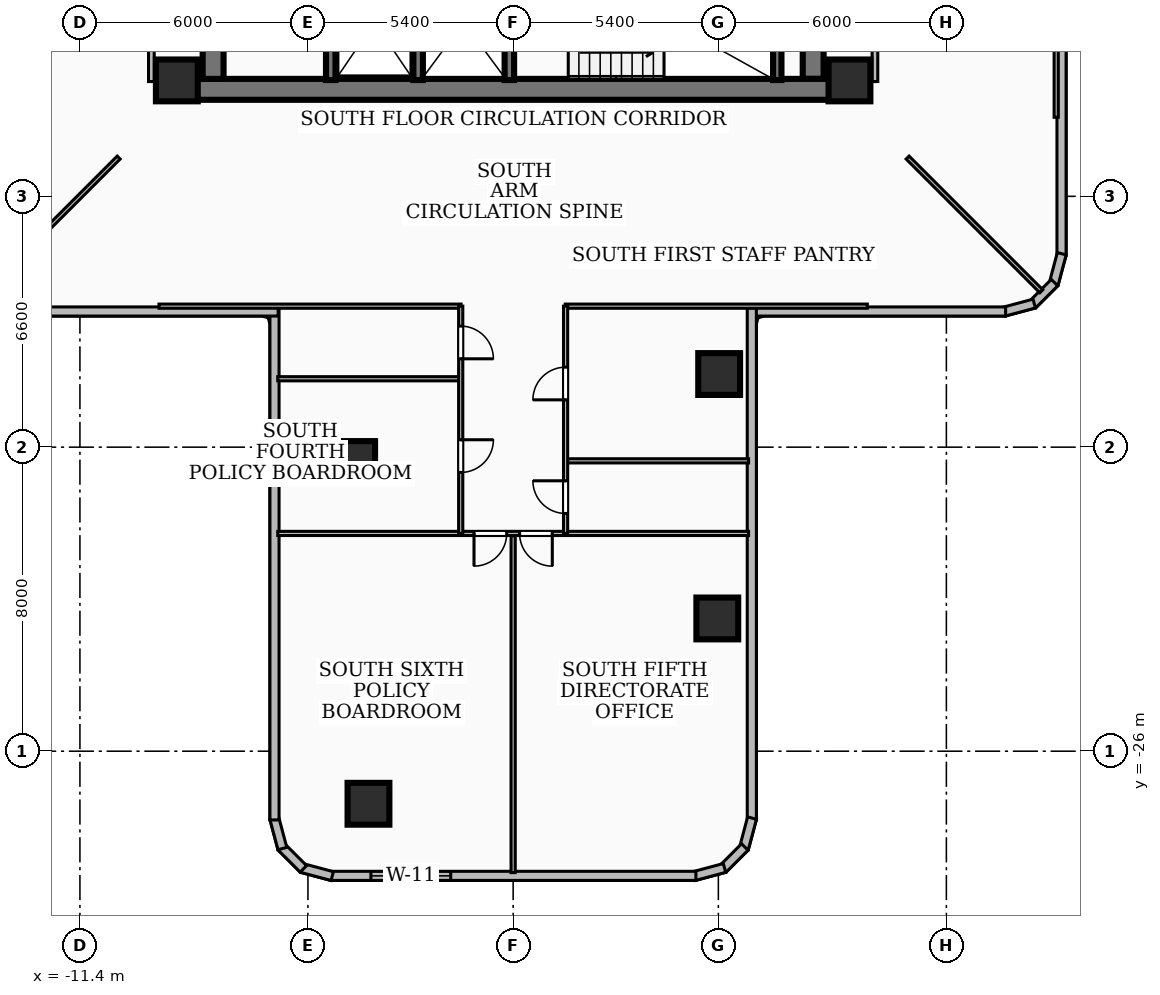
"""IFC4 building model, lengths in metres.
Left out: names, types, materials, properties, quantities, classifications, styles, units other than length and angle.
Written with IfcOpenShell. Run it as: python <this file> out.ifc"""

import sys

from ifc_helpers import new_model, si_unit, direction, frame, frame_2d, origin, origin_2d, place, context, subcontext, project, spatial, rectangle, extrude, element, fill, save


model = new_model("IFC4")
c1 = context("Model", 3, precision=1e-05, world=origin(), true_north=direction((0.0, 1.0)))
c2 = subcontext(c1, "Body", "Model", "MODEL_VIEW")
j1 = project(units=[si_unit("LENGTHUNIT", "METRE"), si_unit("PLANEANGLEUNIT", "RADIAN")], contexts=[c1])
p1 = place(None, origin())
s1 = spatial("IfcSite", under=j1, at=p1, CompositionType="ELEMENT")
p2 = place(p1, origin())
s2 = spatial("IfcBuilding", under=s1, at=p2, CompositionType="ELEMENT")
p3 = place(p2, frame((0.0, 0.0, 31.68)))
s3 = spatial("IfcBuildingStorey", under=s2, at=p3, CompositionType="ELEMENT", Elevation=31.68)
p4 = place(p3, frame((8.78, -8.585, 0.0), z_axis=(0.0, 0.0, 1.0), x_axis=(-1.0, 0.0, 0.0)))
e1 = element("IfcWall", 1, at=p4, inside=s3, PredefinedType="SHEAR", context=c2, shape_type="SweptSolid", body=[
    extrude(rectangle(XDim=17.56, YDim=0.55, at=frame_2d((8.78, 0.0))), origin(), (0.0, 0.0, 1.0), 3.34),
])
for number, where, z_axis, x_axis in (
    (2, (-7.895, -8.31, 0.0), (0.0, 0.0, 1.0), (0.0, 1.0, 0.0)),
    (3, (7.895, -2.025, 0.0), (0.0, 0.0, 1.0), (0.0, -1.0, 0.0)),
):
    element("IfcWall", number, at=place(p3, frame(where, z_axis=z_axis, x_axis=x_axis)), inside=s3, PredefinedType="SHEAR", context=c2, shape_type="SweptSolid", body=[
        extrude(rectangle(XDim=6.285, YDim=0.55, at=frame_2d((3.143, 0.0))), origin(), (0.0, 0.0, 1.0), 3.34),
    ])
p5 = place(p3, frame((6.95, -8.34, 0.0), z_axis=(0.0, 0.0, 1.0), x_axis=(0.0, 1.0, 0.0)))
e4 = element("IfcWall", 4, at=p5, inside=s3, PredefinedType="SOLIDWALL", context=c2, shape_type="SweptSolid", body=[
    extrude(rectangle(XDim=3.06, YDim=0.22, at=frame_2d((1.53, 0.0))), origin(), (0.0, 0.0, 1.0), 3.34),
])
for number, where, z_axis, x_axis in (
    (5, (-0.1, -8.34, 0.0), (0.0, 0.0, 1.0), (0.0, 1.0, 0.0)),
    (6, (-2.5, -8.34, 0.0), (0.0, 0.0, 1.0), (0.0, 1.0, 0.0)),
    (7, (-4.8, -8.34, 0.0), (0.0, 0.0, 1.0), (0.0, 1.0, 0.0)),
):
    element("IfcWall", number, at=place(p3, frame(where, z_axis=z_axis, x_axis=x_axis)), inside=s3, PredefinedType="SOLIDWALL", context=c2, shape_type="SweptSolid", body=[
        extrude(rectangle(XDim=3.04, YDim=0.25, at=frame_2d((1.52, 0.0))), origin(), (0.0, 0.0, 1.0), 3.34),
    ])
for number, where, z_axis, x_axis in (
    (8, (8.85, -8.35, 0.0), (0.0, 0.0, 1.0), (1.0, 0.0, 0.0)),
    (9, (-8.85, -8.35, 0.0), (0.0, 0.0, 1.0), (1.0, 0.0, 0.0)),
    (10, (-4.184, -18.391, 0.0), (0.0, 0.0, 1.0), (1.0, 0.0, 0.0)),
    (11, (5.421, -16.076, 0.0), (0.0, 0.0, 1.0), (1.0, 0.0, 0.0)),
    (12, (-3.807, -27.383, 0.0), (0.0, 0.0, 1.0), (1.0, 0.0, 0.0)),
    (13, (5.372, -22.507, 0.0), (0.0, 0.0, 1.0), (1.0, 0.0, 0.0)),
):
    element("IfcColumn", number, at=place(p3, frame(where, z_axis=z_axis, x_axis=x_axis)), inside=s3, PredefinedType="COLUMN", context=c2, shape_type="SweptSolid", body=[
        extrude(rectangle(XDim=1.1, YDim=1.1, at=origin_2d()), origin(), (0.0, 0.0, 1.0), 3.6),
    ])
p6 = place(p3, frame((14.43, -6.184, 0.0), z_axis=(0.0, 0.0, 1.0), x_axis=(0.0, -1.0, 0.0)))
e14 = element("IfcWall", 14, at=p6, inside=s3, PredefinedType="SOLIDWALL", context=c2, shape_type="SweptSolid", body=[
    extrude(rectangle(XDim=6.775, YDim=0.24, at=frame_2d((3.387, 0.0))), origin(), (0.0, 0.0, 1.0), 3.34),
])
p7 = place(p3, frame((14.436, -12.91, 0.0), z_axis=(0.0, 0.0, 1.0), x_axis=(-0.257937227116, -0.966161677396, 0.0)))
e15 = element("IfcWall", 15, at=p7, inside=s3, PredefinedType="SOLIDWALL", context=c2, shape_type="SweptSolid", body=[
    extrude(rectangle(XDim=0.83, YDim=0.24, at=frame_2d((0.415, 0.0))), origin(), (0.0, 0.0, 1.0), 3.34),
])
p8 = place(p3, frame((14.246, -13.67, 0.0), z_axis=(0.0, 0.0, 1.0), x_axis=(-0.707106781187, -0.707106781187, 0.0)))
e16 = element("IfcWall", 16, at=p8, inside=s3, PredefinedType="SOLIDWALL", context=c2, shape_type="SweptSolid", body=[
    extrude(rectangle(XDim=0.815, YDim=0.24, at=frame_2d((0.407, 0.0))), origin(), (0.0, 0.0, 1.0), 3.34),
])
p9 = place(p3, frame((13.712, -14.222, 0.0), z_axis=(0.0, 0.0, 1.0), x_axis=(-0.966161677396, -0.257937227116, 0.0)))
e17 = element("IfcWall", 17, at=p9, inside=s3, PredefinedType="SOLIDWALL", context=c2, shape_type="SweptSolid", body=[
    extrude(rectangle(XDim=0.83, YDim=0.24, at=frame_2d((0.415, 0.0))), origin(), (0.0, 0.0, 1.0), 3.34),
])
p10 = place(p3, frame((12.959, -14.43, 0.0), z_axis=(0.0, 0.0, 1.0), x_axis=(-1.0, 0.0, 0.0)))
e18 = element("IfcWall", 18, at=p10, inside=s3, PredefinedType="SOLIDWALL", context=c2, shape_type="SweptSolid", body=[
    extrude(rectangle(XDim=6.775, YDim=0.24, at=frame_2d((3.387, 0.0))), origin(), (0.0, 0.0, 1.0), 2.421),
])
p11 = place(p3, frame((6.28, -14.334, 0.0), z_axis=(0.0, 0.0, 1.0), x_axis=(0.0, -1.0, 0.0)))
e19 = element("IfcWall", 19, at=p11, inside=s3, PredefinedType="SOLIDWALL", context=c2, shape_type="SweptSolid", body=[
    extrude(rectangle(XDim=13.475, YDim=0.24, at=frame_2d((6.738, 0.0))), origin(), (0.0, 0.0, 1.0), 2.421),
])
p12 = place(p3, frame((6.286, -27.76, 0.0), z_axis=(0.0, 0.0, 1.0), x_axis=(-0.25766265056, -0.966234939601, 0.0)))
e20 = element("IfcWall", 20, at=p12, inside=s3, PredefinedType="SOLIDWALL", context=c2, shape_type="SweptSolid", body=[
    extrude(rectangle(XDim=0.83, YDim=0.24, at=frame_2d((0.415, 0.0))), origin(), (0.0, 0.0, 1.0), 3.34),
])
p13 = place(p3, frame((6.096, -28.52, 0.0), z_axis=(0.0, 0.0, 1.0), x_axis=(-0.707106781187, -0.707106781187, 0.0)))
e21 = element("IfcWall", 21, at=p13, inside=s3, PredefinedType="SOLIDWALL", context=c2, shape_type="SweptSolid", body=[
    extrude(rectangle(XDim=0.814, YDim=0.24, at=frame_2d((0.407, 0.0))), origin(), (0.0, 0.0, 1.0), 3.34),
])
p14 = place(p3, frame((5.562, -29.072, 0.0), z_axis=(0.0, 0.0, 1.0), x_axis=(-0.966234939601, -0.25766265056, 0.0)))
e22 = element("IfcWall", 22, at=p14, inside=s3, PredefinedType="SOLIDWALL", context=c2, shape_type="SweptSolid", body=[
    extrude(rectangle(XDim=0.83, YDim=0.24, at=frame_2d((0.415, 0.0))), origin(), (0.0, 0.0, 1.0), 3.34),
])
p15 = place(p3, frame((4.809, -29.28, 0.0), z_axis=(0.0, 0.0, 1.0), x_axis=(-1.0, 0.0, 0.0)))
e23 = element("IfcWall", 23, at=p15, inside=s3, PredefinedType="SOLIDWALL", context=c2, shape_type="SweptSolid", body=[
    extrude(rectangle(XDim=9.618, YDim=0.24, at=frame_2d((4.809, 0.0))), origin(), (0.0, 0.0, 1.0), 3.34),
])
p16 = place(p15, frame((6.452, 0.0, 0.85)))
e24 = element("IfcOpeningElement", 24, at=p16, cuts=e23, PredefinedType="OPENING", context=c2, shape_type="SweptSolid", body=[
    extrude(rectangle(XDim=2.1, YDim=1.6, at=frame_2d((1.05, 0.8))), frame((0.0, 0.13, 0.0), z_axis=(0.0, -1.0, 0.0), x_axis=(1.0, 0.0, 0.0)), (0.0, 0.0, 1.0), 0.26),
])
p17 = place(p3, frame((-4.76, -29.286, 0.0), z_axis=(0.0, 0.0, 1.0), x_axis=(-0.966234939601, 0.25766265056, 0.0)))
e25 = element("IfcWall", 25, at=p17, inside=s3, PredefinedType="SOLIDWALL", context=c2, shape_type="SweptSolid", body=[
    extrude(rectangle(XDim=0.83, YDim=0.24, at=frame_2d((0.415, 0.0))), origin(), (0.0, 0.0, 1.0), 3.34),
])
p18 = place(p3, frame((-5.52, -29.096, 0.0), z_axis=(0.0, 0.0, 1.0), x_axis=(-0.707106781187, 0.707106781187, 0.0)))
e26 = element("IfcWall", 26, at=p18, inside=s3, PredefinedType="SOLIDWALL", context=c2, shape_type="SweptSolid", body=[
    extrude(rectangle(XDim=0.814, YDim=0.24, at=frame_2d((0.407, 0.0))), origin(), (0.0, 0.0, 1.0), 3.34),
])
p19 = place(p3, frame((-6.072, -28.562, 0.0), z_axis=(0.0, 0.0, 1.0), x_axis=(-0.25766265056, 0.966234939601, 0.0)))
e27 = element("IfcWall", 27, at=p19, inside=s3, PredefinedType="SOLIDWALL", context=c2, shape_type="SweptSolid", body=[
    extrude(rectangle(XDim=0.83, YDim=0.24, at=frame_2d((0.415, 0.0))), origin(), (0.0, 0.0, 1.0), 3.34),
])
p20 = place(p3, frame((-6.28, -27.809, 0.0), z_axis=(0.0, 0.0, 1.0), x_axis=(0.0, 1.0, 0.0)))
e28 = element("IfcWall", 28, at=p20, inside=s3, PredefinedType="SOLIDWALL", context=c2, shape_type="SweptSolid", body=[
    extrude(rectangle(XDim=13.475, YDim=0.24, at=frame_2d((6.738, 0.0))), origin(), (0.0, 0.0, 1.0), 2.644),
])
p21 = place(p3, frame((-6.184, -14.43, 0.0), z_axis=(0.0, 0.0, 1.0), x_axis=(-1.0, 0.0, 0.0)))
e29 = element("IfcWall", 29, at=p21, inside=s3, PredefinedType="SOLIDWALL", context=c2, shape_type="SweptSolid", body=[
    extrude(rectangle(XDim=6.775, YDim=0.24, at=frame_2d((3.387, 0.0))), origin(), (0.0, 0.0, 1.0), 2.644),
])
for number, where, z_axis, x_axis in (
    (30, (-9.52, -8.38, 0.0), (0.0, 0.0, 1.0), (0.0, 1.0, 0.0)),
    (31, (9.52, -8.38, 0.0), (0.0, 0.0, 1.0), (0.0, 1.0, 0.0)),
):
    element("IfcWall", number, at=place(p3, frame(where, z_axis=z_axis, x_axis=x_axis)), inside=s3, PredefinedType="PARTITIONING", context=c2, shape_type="SweptSolid", body=[
        extrude(rectangle(XDim=6.63, YDim=0.15, at=frame_2d((3.315, 0.0))), origin(), (0.0, 0.0, 1.0), 2.421),
    ])
p22 = place(p3, frame((-10.38, -10.38, 0.0), z_axis=(0.0, 0.0, 1.0), x_axis=(-0.707106781187, -0.707106781187, 0.0)))
e32 = element("IfcWall", 32, at=p22, inside=s3, PredefinedType="PARTITIONING", context=c2, shape_type="SweptSolid", body=[
    extrude(rectangle(XDim=4.975, YDim=0.11, at=frame_2d((2.488, 0.0))), origin(), (0.0, 0.0, 1.0), 2.644),
])
p23 = place(p3, frame((10.38, -10.38, 0.0), z_axis=(0.0, 0.0, 1.0), x_axis=(0.707106781187, -0.707106781187, 0.0)))
e33 = element("IfcWall", 33, at=p23, inside=s3, PredefinedType="PARTITIONING", context=c2, shape_type="SweptSolid", body=[
    extrude(rectangle(XDim=4.975, YDim=0.11, at=frame_2d((2.488, 0.0))), origin(), (0.0, 0.0, 1.0), 3.34),
])
for number, where, z_axis, x_axis in (
    (34, (14.29, -9.32, 0.0), (0.0, 0.0, 1.0), (0.0, 1.0, 0.0)),
    (35, (1.37, -14.29, 0.0), (0.0, 0.0, 1.0), (1.0, 0.0, 0.0)),
    (36, (-9.32, -14.29, 0.0), (0.0, 0.0, 1.0), (1.0, 0.0, 0.0)),
):
    element("IfcWall", number, at=place(p3, frame(where, z_axis=z_axis, x_axis=x_axis)), inside=s3, PredefinedType="PARTITIONING", context=c2, shape_type="SweptSolid", body=[
        extrude(rectangle(XDim=7.95, YDim=0.11, at=frame_2d((3.975, 0.0))), origin(), (0.0, 0.0, 1.0), 2.421),
    ])
for number, where, z_axis, x_axis in (
    (37, (1.4, -18.36, 0.0), (0.0, 0.0, 1.0), (1.0, 0.0, 0.0)),
    (38, (-6.195, -16.2, 0.0), (0.0, 0.0, 1.0), (1.0, 0.0, 0.0)),
):
    element("IfcWall", number, at=place(p3, frame(where, z_axis=z_axis, x_axis=x_axis)), inside=s3, PredefinedType="PARTITIONING", context=c2, shape_type="SweptSolid", body=[
        extrude(rectangle(XDim=4.795, YDim=0.11, at=frame_2d((2.397, 0.0))), origin(), (0.0, 0.0, 1.0), 2.421),
    ])
p24 = place(p3, frame((1.38, -20.27, 0.0), z_axis=(0.0, 0.0, 1.0), x_axis=(0.0, 1.0, 0.0)))
e39 = element("IfcWall", 39, at=p24, inside=s3, PredefinedType="PARTITIONING", context=c2, shape_type="SweptSolid", body=[
    extrude(rectangle(XDim=5.98, YDim=0.11, at=frame_2d((2.99, 0.0))), origin(), (0.0, 0.0, 1.0), 2.869),
])
p25 = place(p24, frame((3.515, 0.0, 0.0)))
e40 = element("IfcOpeningElement", 40, at=p25, cuts=e39, PredefinedType="OPENING", context=c2, shape_type="SweptSolid", body=[
    extrude(rectangle(XDim=0.86, YDim=2.04, at=frame_2d((0.43, 1.02))), frame((0.0, 0.065, 0.0), z_axis=(0.0, -1.0, 0.0), x_axis=(1.0, 0.0, 0.0)), (0.0, 0.0, 1.0), 0.13),
])
p26 = place(p24, frame((0.525, 0.0, 0.0)))
e41 = element("IfcOpeningElement", 41, at=p26, cuts=e39, PredefinedType="OPENING", context=c2, shape_type="SweptSolid", body=[
    extrude(rectangle(XDim=0.86, YDim=2.04, at=frame_2d((0.43, 1.02))), frame((0.0, 0.065, 0.0), z_axis=(0.0, -1.0, 0.0), x_axis=(1.0, 0.0, 0.0)), (0.0, 0.0, 1.0), 0.13),
])
p27 = place(p3, frame((-1.38, -14.29, 0.0), z_axis=(0.0, 0.0, 1.0), x_axis=(0.0, -1.0, 0.0)))
e42 = element("IfcWall", 42, at=p27, inside=s3, PredefinedType="PARTITIONING", context=c2, shape_type="SweptSolid", body=[
    extrude(rectangle(XDim=5.98, YDim=0.11, at=frame_2d((2.99, 0.0))), origin(), (0.0, 0.0, 1.0), 2.869),
])
p28 = place(p27, frame((0.525, 0.0, 0.0)))
e43 = element("IfcOpeningElement", 43, at=p28, cuts=e42, PredefinedType="OPENING", context=c2, shape_type="SweptSolid", body=[
    extrude(rectangle(XDim=0.86, YDim=2.04, at=frame_2d((0.43, 1.02))), frame((0.0, 0.065, 0.0), z_axis=(0.0, -1.0, 0.0), x_axis=(1.0, 0.0, 0.0)), (0.0, 0.0, 1.0), 0.13),
])
p29 = place(p27, frame((3.515, 0.0, 0.0)))
e44 = element("IfcOpeningElement", 44, at=p29, cuts=e42, PredefinedType="OPENING", context=c2, shape_type="SweptSolid", body=[
    extrude(rectangle(XDim=0.86, YDim=2.04, at=frame_2d((0.43, 1.02))), frame((0.0, 0.065, 0.0), z_axis=(0.0, -1.0, 0.0), x_axis=(1.0, 0.0, 0.0)), (0.0, 0.0, 1.0), 0.13),
])
p30 = place(p3, frame((0.0, -20.33, 0.0), z_axis=(0.0, 0.0, 1.0), x_axis=(0.0, -1.0, 0.0)))
e45 = element("IfcWall", 45, at=p30, inside=s3, PredefinedType="PARTITIONING", context=c2, shape_type="SweptSolid", body=[
    extrude(rectangle(XDim=8.865, YDim=0.11, at=frame_2d((4.433, 0.0))), origin(), (0.0, 0.0, 1.0), 2.72),
])
p31 = place(p3, frame((6.195, -20.27, 0.0), z_axis=(0.0, 0.0, 1.0), x_axis=(-1.0, 0.0, 0.0)))
e46 = element("IfcWall", 46, at=p31, inside=s3, PredefinedType="PARTITIONING", context=c2, shape_type="SweptSolid", body=[
    extrude(rectangle(XDim=12.39, YDim=0.11, at=frame_2d((6.195, 0.0))), origin(), (0.0, 0.0, 1.0), 2.421),
])
p32 = place(p31, frame((6.365, 0.0, 0.0)))
e47 = element("IfcOpeningElement", 47, at=p32, cuts=e46, PredefinedType="OPENING", context=c2, shape_type="SweptSolid", body=[
    extrude(rectangle(XDim=0.86, YDim=2.04, at=frame_2d((0.43, 1.02))), frame((0.0, 0.065, 0.0), z_axis=(0.0, -1.0, 0.0), x_axis=(1.0, 0.0, 0.0)), (0.0, 0.0, 1.0), 0.13),
])
p33 = place(p31, frame((5.165, 0.0, 0.0)))
e48 = element("IfcOpeningElement", 48, at=p33, cuts=e46, PredefinedType="OPENING", context=c2, shape_type="SweptSolid", body=[
    extrude(rectangle(XDim=0.86, YDim=2.04, at=frame_2d((0.43, 1.02))), frame((0.0, 0.065, 0.0), z_axis=(0.0, -1.0, 0.0), x_axis=(1.0, 0.0, 0.0)), (0.0, 0.0, 1.0), 0.13),
])
p34 = place(p16, origin())
e49 = element("IfcWindow", 49, at=p34, inside=s3, PartitioningType="SINGLE_PANEL", PredefinedType="WINDOW", context=c2, shape_type="SweptSolid", body=[
    extrude(rectangle(XDim=2.1, YDim=1.6, at=frame_2d((1.05, 0.8))), frame((0.0, 0.03, 0.0), z_axis=(0.0, -1.0, 0.0), x_axis=(1.0, 0.0, 0.0)), (0.0, 0.0, 1.0), 0.06),
])
fill(e24, e49)
p35 = place(p25, origin())
e50 = element("IfcDoor", 50, at=p35, inside=s3, OperationType="SINGLE_SWING_LEFT", PredefinedType="DOOR", context=c2, shape_type="SweptSolid", body=[
    extrude(rectangle(XDim=0.86, YDim=2.04, at=frame_2d((0.43, 1.02))), frame((0.0, 0.025, 0.0), z_axis=(0.0, -1.0, 0.0), x_axis=(1.0, 0.0, 0.0)), (0.0, 0.0, 1.0), 0.05),
])
fill(e40, e50)
p36 = place(p26, origin())
e51 = element("IfcDoor", 51, at=p36, inside=s3, OperationType="SINGLE_SWING_RIGHT", PredefinedType="DOOR", context=c2, shape_type="SweptSolid", body=[
    extrude(rectangle(XDim=0.86, YDim=2.04, at=frame_2d((0.43, 1.02))), frame((0.0, 0.025, 0.0), z_axis=(0.0, -1.0, 0.0), x_axis=(1.0, 0.0, 0.0)), (0.0, 0.0, 1.0), 0.05),
])
fill(e41, e51)
p37 = place(p28, origin())
e52 = element("IfcDoor", 52, at=p37, inside=s3, OperationType="SINGLE_SWING_RIGHT", PredefinedType="DOOR", context=c2, shape_type="SweptSolid", body=[
    extrude(rectangle(XDim=0.86, YDim=2.04, at=frame_2d((0.43, 1.02))), frame((0.0, 0.025, 0.0), z_axis=(0.0, -1.0, 0.0), x_axis=(1.0, 0.0, 0.0)), (0.0, 0.0, 1.0), 0.05),
])
fill(e43, e52)
p38 = place(p29, origin())
e53 = element("IfcDoor", 53, at=p38, inside=s3, OperationType="SINGLE_SWING_LEFT", PredefinedType="DOOR", context=c2, shape_type="SweptSolid", body=[
    extrude(rectangle(XDim=0.86, YDim=2.04, at=frame_2d((0.43, 1.02))), frame((0.0, 0.025, 0.0), z_axis=(0.0, -1.0, 0.0), x_axis=(1.0, 0.0, 0.0)), (0.0, 0.0, 1.0), 0.05),
])
fill(e44, e53)
p39 = place(p32, origin())
e54 = element("IfcDoor", 54, at=p39, inside=s3, OperationType="SINGLE_SWING_RIGHT", PredefinedType="DOOR", context=c2, shape_type="SweptSolid", body=[
    extrude(rectangle(XDim=0.86, YDim=2.04, at=frame_2d((0.43, 1.02))), frame((0.0, 0.025, 0.0), z_axis=(0.0, -1.0, 0.0), x_axis=(1.0, 0.0, 0.0)), (0.0, 0.0, 1.0), 0.05),
])
fill(e47, e54)
p40 = place(p33, origin())
e55 = element("IfcDoor", 55, at=p40, inside=s3, OperationType="SINGLE_SWING_LEFT", PredefinedType="DOOR", context=c2, shape_type="SweptSolid", body=[
    extrude(rectangle(XDim=0.86, YDim=2.04, at=frame_2d((0.43, 1.02))), frame((0.0, 0.025, 0.0), z_axis=(0.0, -1.0, 0.0), x_axis=(1.0, 0.0, 0.0)), (0.0, 0.0, 1.0), 0.05),
])
fill(e48, e55)
save(model, sys.argv[1])
